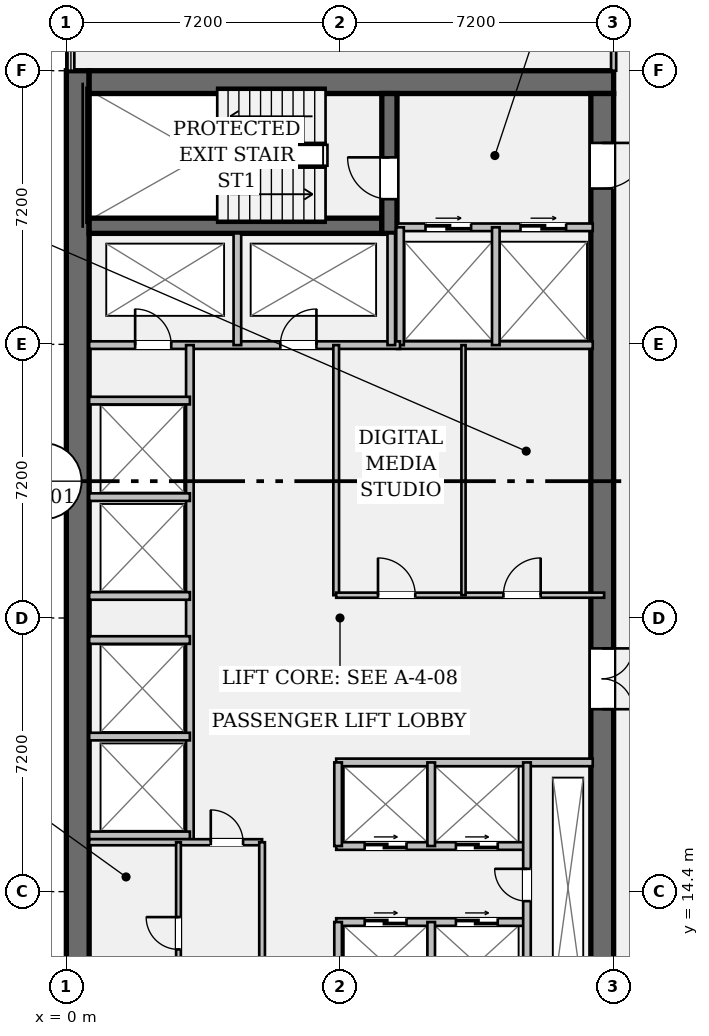
"""IFC4 building model, lengths in metres.
Left out: names, types, materials, properties, quantities, classifications, styles, units other than length and angle.
Written with IfcOpenShell. Run it as: python <this file> out.ifc"""

import sys

from ifc_helpers import new_model, si_unit, direction, frame, frame_2d, origin, place, context, subcontext, project, spatial, rectangle, extrude, element, fill, save


model = new_model("IFC4")
c1 = context("Model", 3, precision=1e-05, world=origin(), true_north=direction((0.0, 1.0)))
c2 = subcontext(c1, "Body", "Model", "MODEL_VIEW")
j1 = project(units=[si_unit("LENGTHUNIT", "METRE"), si_unit("PLANEANGLEUNIT", "RADIAN")], contexts=[c1])
p1 = place(None, origin())
s1 = spatial("IfcSite", under=j1, at=p1, CompositionType="ELEMENT")
p2 = place(p1, origin())
s2 = spatial("IfcBuilding", under=s1, at=p2, CompositionType="ELEMENT")
p3 = place(p2, frame((0.0, 0.0, 113.75)))
s3 = spatial("IfcBuildingStorey", under=s2, at=p3, CompositionType="ELEMENT", Elevation=113.75)
p4 = place(p3, frame((0.3, 7.2, 0.0), z_axis=(0.0, 0.0, 1.0), x_axis=(0.0, 1.0, 0.0)))
e1 = element("IfcWall", 1, at=p4, inside=s3, PredefinedType="SHEAR", context=c2, shape_type="SweptSolid", body=[
    extrude(rectangle(XDim=28.8, YDim=0.6, at=frame_2d((14.4, 0.0))), origin(), (0.0, 0.0, 1.0), 3.58),
])
p5 = place(p3, frame((0.6, 35.7, 0.0), z_axis=(0.0, 0.0, 1.0), x_axis=(1.0, 0.0, 0.0)))
e2 = element("IfcWall", 2, at=p5, inside=s3, PredefinedType="SHEAR", context=c2, shape_type="SweptSolid", body=[
    extrude(rectangle(XDim=13.8, YDim=0.6, at=frame_2d((6.9, 0.0))), origin(), (0.0, 0.0, 1.0), 3.58),
])
p6 = place(p3, frame((14.1, 35.4, 0.0), z_axis=(0.0, 0.0, 1.0), x_axis=(0.0, -1.0, 0.0)))
e3 = element("IfcWall", 3, at=p6, inside=s3, PredefinedType="SHEAR", context=c2, shape_type="SweptSolid", body=[
    extrude(rectangle(XDim=27.6, YDim=0.6, at=frame_2d((13.8, 0.0))), origin(), (0.0, 0.0, 1.0), 3.58),
])
p7 = place(p6, frame((1.3, 0.0, 0.0)))
e4 = element("IfcOpeningElement", 4, at=p7, cuts=e3, PredefinedType="OPENING", context=c2, shape_type="SweptSolid", body=[
    extrude(rectangle(XDim=1.2, YDim=2.15, at=frame_2d((0.6, 1.075))), frame((0.0, 0.312, 0.0), z_axis=(0.0, -1.0, 0.0), x_axis=(1.0, 0.0, 0.0)), (0.0, 0.0, 1.0), 0.624),
])
p8 = place(p6, frame((25.25, 0.0, 0.0)))
e5 = element("IfcOpeningElement", 5, at=p8, cuts=e3, PredefinedType="OPENING", context=c2, shape_type="SweptSolid", body=[
    extrude(rectangle(XDim=1.2, YDim=2.15, at=frame_2d((0.6, 1.075))), frame((0.0, 0.312, 0.0), z_axis=(0.0, -1.0, 0.0), x_axis=(1.0, 0.0, 0.0)), (0.0, 0.0, 1.0), 0.624),
])
p9 = place(p6, frame((14.6, 0.0, 0.0)))
e6 = element("IfcOpeningElement", 6, at=p9, cuts=e3, PredefinedType="OPENING", context=c2, shape_type="SweptSolid", body=[
    extrude(rectangle(XDim=1.6, YDim=2.2, at=frame_2d((0.8, 1.1))), frame((0.0, 0.312, 0.0), z_axis=(0.0, -1.0, 0.0), x_axis=(1.0, 0.0, 0.0)), (0.0, 0.0, 1.0), 0.624),
])
p10 = place(p3, frame((0.6, 31.92, 0.0), z_axis=(0.0, 0.0, 1.0), x_axis=(1.0, 0.0, 0.0)))
e7 = element("IfcWall", 7, at=p10, inside=s3, PredefinedType="SHEAR", context=c2, shape_type="SweptSolid", body=[
    extrude(rectangle(XDim=7.7, YDim=0.4, at=frame_2d((3.85, 0.0))), origin(), (0.0, 0.0, 1.0), 3.58),
])
p11 = place(p3, frame((8.5, 31.72, 0.0), z_axis=(0.0, 0.0, 1.0), x_axis=(0.0, 1.0, 0.0)))
e8 = element("IfcWall", 8, at=p11, inside=s3, PredefinedType="SHEAR", context=c2, shape_type="SweptSolid", body=[
    extrude(rectangle(XDim=3.68, YDim=0.4, at=frame_2d((1.84, 0.0))), origin(), (0.0, 0.0, 1.0), 3.58),
])
p12 = place(p11, frame((0.9, 0.0, 0.0)))
e9 = element("IfcOpeningElement", 9, at=p12, cuts=e8, PredefinedType="OPENING", context=c2, shape_type="SweptSolid", body=[
    extrude(rectangle(XDim=1.1, YDim=2.15, at=frame_2d((0.55, 1.075))), frame((0.0, 0.212, 0.0), z_axis=(0.0, -1.0, 0.0), x_axis=(1.0, 0.0, 0.0)), (0.0, 0.0, 1.0), 0.424),
])
p13 = place(p3, frame((8.7, 31.88, 0.0), z_axis=(0.0, 0.0, 1.0), x_axis=(1.0, 0.0, 0.0)))
e10 = element("IfcWall", 10, at=p13, inside=s3, PredefinedType="PARTITIONING", context=c2, shape_type="SweptSolid", body=[
    extrude(rectangle(XDim=5.15, YDim=0.2, at=frame_2d((2.575, 0.0))), origin(), (0.0, 0.0, 1.0), 3.58),
])
p14 = place(p13, frame((0.75, 0.0, 0.0)))
e11 = element("IfcOpeningElement", 11, at=p14, cuts=e10, PredefinedType="OPENING", context=c2, shape_type="SweptSolid", body=[
    extrude(rectangle(XDim=1.2, YDim=2.2, at=frame_2d((0.6, 1.1))), frame((0.0, 0.112, 0.0), z_axis=(0.0, -1.0, 0.0), x_axis=(1.0, 0.0, 0.0)), (0.0, 0.0, 1.0), 0.224),
])
p15 = place(p13, frame((3.25, 0.0, 0.0)))
e12 = element("IfcOpeningElement", 12, at=p15, cuts=e10, PredefinedType="OPENING", context=c2, shape_type="SweptSolid", body=[
    extrude(rectangle(XDim=1.2, YDim=2.2, at=frame_2d((0.6, 1.1))), frame((0.0, 0.112, 0.0), z_axis=(0.0, -1.0, 0.0), x_axis=(1.0, 0.0, 0.0)), (0.0, 0.0, 1.0), 0.224),
])
p16 = place(p3, frame((8.7, 28.78, 0.0), z_axis=(0.0, 0.0, 1.0), x_axis=(1.0, 0.0, 0.0)))
e13 = element("IfcWall", 13, at=p16, inside=s3, PredefinedType="PARTITIONING", context=c2, shape_type="SweptSolid", body=[
    extrude(rectangle(XDim=5.15, YDim=0.2, at=frame_2d((2.575, 0.0))), origin(), (0.0, 0.0, 1.0), 3.58),
])
for number, where, z_axis, x_axis in (
    (14, (8.78, 28.78, 0.0), (0.0, 0.0, 1.0), (0.0, 1.0, 0.0)),
    (15, (11.3, 28.78, 0.0), (0.0, 0.0, 1.0), (0.0, 1.0, 0.0)),
):
    element("IfcWall", number, at=place(p3, frame(where, z_axis=z_axis, x_axis=x_axis)), inside=s3, PredefinedType="PARTITIONING", context=c2, shape_type="SweptSolid", body=[
        extrude(rectangle(XDim=3.1, YDim=0.2, at=frame_2d((1.55, 0.0))), origin(), (0.0, 0.0, 1.0), 3.58),
    ])
p17 = place(p3, frame((0.6, 28.78, 0.0), z_axis=(0.0, 0.0, 1.0), x_axis=(1.0, 0.0, 0.0)))
e16 = element("IfcWall", 16, at=p17, inside=s3, PredefinedType="PARTITIONING", context=c2, shape_type="SweptSolid", body=[
    extrude(rectangle(XDim=8.18, YDim=0.2, at=frame_2d((4.09, 0.0))), origin(), (0.0, 0.0, 1.0), 3.58),
])
p18 = place(p17, frame((1.21, 0.0, 0.0)))
e17 = element("IfcOpeningElement", 17, at=p18, cuts=e16, PredefinedType="OPENING", context=c2, shape_type="SweptSolid", body=[
    extrude(rectangle(XDim=0.95, YDim=2.15, at=frame_2d((0.475, 1.075))), frame((0.0, 0.112, 0.0), z_axis=(0.0, -1.0, 0.0), x_axis=(1.0, 0.0, 0.0)), (0.0, 0.0, 1.0), 0.224),
])
p19 = place(p17, frame((5.03, 0.0, 0.0)))
e18 = element("IfcOpeningElement", 18, at=p19, cuts=e16, PredefinedType="OPENING", context=c2, shape_type="SweptSolid", body=[
    extrude(rectangle(XDim=0.95, YDim=2.15, at=frame_2d((0.475, 1.075))), frame((0.0, 0.112, 0.0), z_axis=(0.0, -1.0, 0.0), x_axis=(1.0, 0.0, 0.0)), (0.0, 0.0, 1.0), 0.224),
])
for number, where, z_axis, x_axis in (
    (19, (4.5, 28.78, 0.0), (0.0, 0.0, 1.0), (0.0, 1.0, 0.0)),
    (20, (8.55, 28.78, 0.0), (0.0, 0.0, 1.0), (0.0, 1.0, 0.0)),
):
    element("IfcWall", number, at=place(p3, frame(where, z_axis=z_axis, x_axis=x_axis)), inside=s3, PredefinedType="PARTITIONING", context=c2, shape_type="SweptSolid", body=[
        extrude(rectangle(XDim=2.94, YDim=0.2, at=frame_2d((1.47, 0.0))), origin(), (0.0, 0.0, 1.0), 3.58),
    ])
p20 = place(p3, frame((3.25, 15.7, 0.0), z_axis=(0.0, 0.0, 1.0), x_axis=(0.0, 1.0, 0.0)))
e21 = element("IfcWall", 21, at=p20, inside=s3, PredefinedType="PARTITIONING", context=c2, shape_type="SweptSolid", body=[
    extrude(rectangle(XDim=13.08, YDim=0.2, at=frame_2d((6.54, 0.0))), origin(), (0.0, 0.0, 1.0), 3.58),
])
for number, where, z_axis, x_axis in (
    (22, (0.6, 15.88, 0.0), (0.0, 0.0, 1.0), (1.0, 0.0, 0.0)),
    (23, (0.6, 18.48, 0.0), (0.0, 0.0, 1.0), (1.0, 0.0, 0.0)),
    (24, (0.6, 22.18, 0.0), (0.0, 0.0, 1.0), (1.0, 0.0, 0.0)),
    (25, (0.6, 24.78, 0.0), (0.0, 0.0, 1.0), (1.0, 0.0, 0.0)),
    (26, (0.6, 21.02, 0.0), (0.0, 0.0, 1.0), (1.0, 0.0, 0.0)),
    (27, (0.6, 27.32, 0.0), (0.0, 0.0, 1.0), (1.0, 0.0, 0.0)),
):
    element("IfcWall", number, at=place(p3, frame(where, z_axis=z_axis, x_axis=x_axis)), inside=s3, PredefinedType="PARTITIONING", context=c2, shape_type="SweptSolid", body=[
        extrude(rectangle(XDim=2.65, YDim=0.2, at=frame_2d((1.325, 0.0))), origin(), (0.0, 0.0, 1.0), 3.58),
    ])
p21 = place(p3, frame((7.1, 22.2, 0.0), z_axis=(0.0, 0.0, 1.0), x_axis=(0.0, 1.0, 0.0)))
e28 = element("IfcWall", 28, at=p21, inside=s3, PredefinedType="PARTITIONING", context=c2, shape_type="SweptSolid", body=[
    extrude(rectangle(XDim=6.58, YDim=0.15, at=frame_2d((3.29, 0.0))), origin(), (0.0, 0.0, 1.0), 3.58),
])
p22 = place(p3, frame((7.1, 22.2, 0.0), z_axis=(0.0, 0.0, 1.0), x_axis=(1.0, 0.0, 0.0)))
e29 = element("IfcWall", 29, at=p22, inside=s3, PredefinedType="PARTITIONING", context=c2, shape_type="SweptSolid", body=[
    extrude(rectangle(XDim=7.05, YDim=0.135, at=frame_2d((3.525, 0.0))), origin(), (0.0, 0.0, 1.0), 3.58),
])
p23 = place(p22, frame((1.1, 0.0, 0.0)))
e30 = element("IfcOpeningElement", 30, at=p23, cuts=e29, PredefinedType="OPENING", context=c2, shape_type="SweptSolid", body=[
    extrude(rectangle(XDim=0.98, YDim=2.15, at=frame_2d((0.49, 1.075))), frame((0.0, 0.08, 0.0), z_axis=(0.0, -1.0, 0.0), x_axis=(1.0, 0.0, 0.0)), (0.0, 0.0, 1.0), 0.159),
])
p24 = place(p22, frame((4.4, 0.0, 0.0)))
e31 = element("IfcOpeningElement", 31, at=p24, cuts=e29, PredefinedType="OPENING", context=c2, shape_type="SweptSolid", body=[
    extrude(rectangle(XDim=0.98, YDim=2.15, at=frame_2d((0.49, 1.075))), frame((0.0, 0.08, 0.0), z_axis=(0.0, -1.0, 0.0), x_axis=(1.0, 0.0, 0.0)), (0.0, 0.0, 1.0), 0.159),
])
p25 = place(p3, frame((10.45, 22.2, 0.0), z_axis=(0.0, 0.0, 1.0), x_axis=(0.0, 1.0, 0.0)))
e32 = element("IfcWall", 32, at=p25, inside=s3, PredefinedType="PARTITIONING", context=c2, shape_type="SweptSolid", body=[
    extrude(rectangle(XDim=6.58, YDim=0.11, at=frame_2d((3.29, 0.0))), origin(), (0.0, 0.0, 1.0), 3.58),
])
p26 = place(p3, frame((7.1, 17.8, 0.0), z_axis=(0.0, 0.0, 1.0), x_axis=(1.0, 0.0, 0.0)))
e33 = element("IfcWall", 33, at=p26, inside=s3, PredefinedType="PARTITIONING", context=c2, shape_type="SweptSolid", body=[
    extrude(rectangle(XDim=6.75, YDim=0.2, at=frame_2d((3.375, 0.0))), origin(), (0.0, 0.0, 1.0), 3.58),
])
p27 = place(p3, frame((7.1, 15.6, 0.0), z_axis=(0.0, 0.0, 1.0), x_axis=(1.0, 0.0, 0.0)))
e34 = element("IfcWall", 34, at=p27, inside=s3, PredefinedType="PARTITIONING", context=c2, shape_type="SweptSolid", body=[
    extrude(rectangle(XDim=5.02, YDim=0.2, at=frame_2d((2.51, 0.0))), origin(), (0.0, 0.0, 1.0), 3.58),
])
p28 = place(p27, frame((0.75, 0.0, 0.0)))
e35 = element("IfcOpeningElement", 35, at=p28, cuts=e34, PredefinedType="OPENING", context=c2, shape_type="SweptSolid", body=[
    extrude(rectangle(XDim=1.1, YDim=2.2, at=frame_2d((0.55, 1.1))), frame((0.0, 0.112, 0.0), z_axis=(0.0, -1.0, 0.0), x_axis=(1.0, 0.0, 0.0)), (0.0, 0.0, 1.0), 0.224),
])
p29 = place(p27, frame((3.15, 0.0, 0.0)))
e36 = element("IfcOpeningElement", 36, at=p29, cuts=e34, PredefinedType="OPENING", context=c2, shape_type="SweptSolid", body=[
    extrude(rectangle(XDim=1.1, YDim=2.2, at=frame_2d((0.55, 1.1))), frame((0.0, 0.112, 0.0), z_axis=(0.0, -1.0, 0.0), x_axis=(1.0, 0.0, 0.0)), (0.0, 0.0, 1.0), 0.224),
])
p30 = place(p3, frame((7.1, 13.6, 0.0), z_axis=(0.0, 0.0, 1.0), x_axis=(1.0, 0.0, 0.0)))
e37 = element("IfcWall", 37, at=p30, inside=s3, PredefinedType="PARTITIONING", context=c2, shape_type="SweptSolid", body=[
    extrude(rectangle(XDim=5.02, YDim=0.2, at=frame_2d((2.51, 0.0))), origin(), (0.0, 0.0, 1.0), 3.58),
])
p31 = place(p30, frame((0.75, 0.0, 0.0)))
e38 = element("IfcOpeningElement", 38, at=p31, cuts=e37, PredefinedType="OPENING", context=c2, shape_type="SweptSolid", body=[
    extrude(rectangle(XDim=1.1, YDim=2.2, at=frame_2d((0.55, 1.1))), frame((0.0, 0.112, 0.0), z_axis=(0.0, -1.0, 0.0), x_axis=(1.0, 0.0, 0.0)), (0.0, 0.0, 1.0), 0.224),
])
p32 = place(p30, frame((3.15, 0.0, 0.0)))
e39 = element("IfcOpeningElement", 39, at=p32, cuts=e37, PredefinedType="OPENING", context=c2, shape_type="SweptSolid", body=[
    extrude(rectangle(XDim=1.1, YDim=2.2, at=frame_2d((0.55, 1.1))), frame((0.0, 0.112, 0.0), z_axis=(0.0, -1.0, 0.0), x_axis=(1.0, 0.0, 0.0)), (0.0, 0.0, 1.0), 0.224),
])
p33 = place(p3, frame((7.15, 15.6, 0.0), z_axis=(0.0, 0.0, 1.0), x_axis=(0.0, 1.0, 0.0)))
e40 = element("IfcWall", 40, at=p33, inside=s3, PredefinedType="PARTITIONING", context=c2, shape_type="SweptSolid", body=[
    extrude(rectangle(XDim=2.2, YDim=0.2, at=frame_2d((1.1, 0.0))), origin(), (0.0, 0.0, 1.0), 3.58),
])
p34 = place(p3, frame((7.15, 11.2, 0.0), z_axis=(0.0, 0.0, 1.0), x_axis=(0.0, 1.0, 0.0)))
e41 = element("IfcWall", 41, at=p34, inside=s3, PredefinedType="PARTITIONING", context=c2, shape_type="SweptSolid", body=[
    extrude(rectangle(XDim=2.4, YDim=0.2, at=frame_2d((1.2, 0.0))), origin(), (0.0, 0.0, 1.0), 3.58),
])
p35 = place(p3, frame((9.6, 15.6, 0.0), z_axis=(0.0, 0.0, 1.0), x_axis=(0.0, 1.0, 0.0)))
e42 = element("IfcWall", 42, at=p35, inside=s3, PredefinedType="PARTITIONING", context=c2, shape_type="SweptSolid", body=[
    extrude(rectangle(XDim=2.2, YDim=0.2, at=frame_2d((1.1, 0.0))), origin(), (0.0, 0.0, 1.0), 3.58),
])
p36 = place(p3, frame((9.6, 11.2, 0.0), z_axis=(0.0, 0.0, 1.0), x_axis=(0.0, 1.0, 0.0)))
e43 = element("IfcWall", 43, at=p36, inside=s3, PredefinedType="PARTITIONING", context=c2, shape_type="SweptSolid", body=[
    extrude(rectangle(XDim=2.4, YDim=0.2, at=frame_2d((1.2, 0.0))), origin(), (0.0, 0.0, 1.0), 3.58),
])
p37 = place(p3, frame((12.12, 11.2, 0.0), z_axis=(0.0, 0.0, 1.0), x_axis=(0.0, 1.0, 0.0)))
e44 = element("IfcWall", 44, at=p37, inside=s3, PredefinedType="PARTITIONING", context=c2, shape_type="SweptSolid", body=[
    extrude(rectangle(XDim=6.6, YDim=0.2, at=frame_2d((3.3, 0.0))), origin(), (0.0, 0.0, 1.0), 3.58),
])
p38 = place(p37, frame((2.95, 0.0, 0.0)))
e45 = element("IfcOpeningElement", 45, at=p38, cuts=e44, PredefinedType="OPENING", context=c2, shape_type="SweptSolid", body=[
    extrude(rectangle(XDim=0.85, YDim=2.15, at=frame_2d((0.425, 1.075))), frame((0.0, 0.112, 0.0), z_axis=(0.0, -1.0, 0.0), x_axis=(1.0, 0.0, 0.0)), (0.0, 0.0, 1.0), 0.224),
])
p39 = place(p3, frame((0.6, 15.7, 0.0), z_axis=(0.0, 0.0, 1.0), x_axis=(1.0, 0.0, 0.0)))
e46 = element("IfcWall", 46, at=p39, inside=s3, PredefinedType="PARTITIONING", context=c2, shape_type="SweptSolid", body=[
    extrude(rectangle(XDim=4.55, YDim=0.16, at=frame_2d((2.275, 0.0))), origin(), (0.0, 0.0, 1.0), 3.58),
])
p40 = place(p39, frame((3.2, 0.0, 0.0)))
e47 = element("IfcOpeningElement", 47, at=p40, cuts=e46, PredefinedType="OPENING", context=c2, shape_type="SweptSolid", body=[
    extrude(rectangle(XDim=0.85, YDim=2.15, at=frame_2d((0.425, 1.075))), frame((0.0, 0.092, 0.0), z_axis=(0.0, -1.0, 0.0), x_axis=(1.0, 0.0, 0.0)), (0.0, 0.0, 1.0), 0.184),
])
p41 = place(p3, frame((5.15, 11.28, 0.0), z_axis=(0.0, 0.0, 1.0), x_axis=(0.0, 1.0, 0.0)))
e48 = element("IfcWall", 48, at=p41, inside=s3, PredefinedType="PARTITIONING", context=c2, shape_type="SweptSolid", body=[
    extrude(rectangle(XDim=4.42, YDim=0.15, at=frame_2d((2.21, 0.0))), origin(), (0.0, 0.0, 1.0), 3.58),
])
p42 = place(p3, frame((2.95, 11.28, 0.0), z_axis=(0.0, 0.0, 1.0), x_axis=(0.0, 1.0, 0.0)))
e49 = element("IfcWall", 49, at=p42, inside=s3, PredefinedType="PARTITIONING", context=c2, shape_type="SweptSolid", body=[
    extrude(rectangle(XDim=4.42, YDim=0.125, at=frame_2d((2.21, 0.0))), origin(), (0.0, 0.0, 1.0), 3.58),
])
p43 = place(p42, frame((1.6, 0.0, 0.0)))
e50 = element("IfcOpeningElement", 50, at=p43, cuts=e49, PredefinedType="OPENING", context=c2, shape_type="SweptSolid", body=[
    extrude(rectangle(XDim=0.85, YDim=2.15, at=frame_2d((0.425, 1.075))), frame((0.0, 0.074, 0.0), z_axis=(0.0, -1.0, 0.0), x_axis=(1.0, 0.0, 0.0)), (0.0, 0.0, 1.0), 0.149),
])
p44 = place(p3, frame((14.4, 36.0, 0.0), z_axis=(0.0, 0.0, 1.0), x_axis=(0.0, 1.0, 0.0)))
e51 = element("IfcWall", 51, at=p44, inside=s3, PredefinedType="PARTITIONING", context=c2, shape_type="SweptSolid", body=[
    extrude(rectangle(XDim=7.08, YDim=0.135, at=frame_2d((3.54, 0.0))), origin(), (0.0, 0.0, 1.0), 2.869),
])
p45 = place(p44, frame((0.85, 0.0, 0.0)))
e52 = element("IfcOpeningElement", 52, at=p45, cuts=e51, PredefinedType="OPENING", context=c2, shape_type="SweptSolid", body=[
    extrude(rectangle(XDim=0.98, YDim=2.15, at=frame_2d((0.49, 1.075))), frame((0.0, 0.08, 0.0), z_axis=(0.0, -1.0, 0.0), x_axis=(1.0, 0.0, 0.0)), (0.0, 0.0, 1.0), 0.159),
])
p46 = place(p12, origin())
e53 = element("IfcDoor", 53, at=p46, inside=s3, OperationType="SINGLE_SWING_RIGHT", PredefinedType="DOOR", context=c2, shape_type="SweptSolid", body=[
    extrude(rectangle(XDim=1.1, YDim=2.15, at=frame_2d((0.55, 1.075))), frame((0.0, 0.025, 0.0), z_axis=(0.0, -1.0, 0.0), x_axis=(1.0, 0.0, 0.0)), (0.0, 0.0, 1.0), 0.05),
])
fill(e9, e53)
p47 = place(p7, origin())
e54 = element("IfcDoor", 54, at=p47, inside=s3, OperationType="SINGLE_SWING_LEFT", PredefinedType="DOOR", context=c2, shape_type="SweptSolid", body=[
    extrude(rectangle(XDim=1.2, YDim=2.15, at=frame_2d((0.6, 1.075))), frame((0.0, 0.025, 0.0), z_axis=(0.0, -1.0, 0.0), x_axis=(1.0, 0.0, 0.0)), (0.0, 0.0, 1.0), 0.05),
])
fill(e4, e54)
p48 = place(p14, origin())
e55 = element("IfcDoor", 55, at=p48, inside=s3, OperationType="DOUBLE_DOOR_SLIDING", PredefinedType="DOOR", context=c2, shape_type="SweptSolid", body=[
    extrude(rectangle(XDim=1.2, YDim=2.2, at=frame_2d((0.6, 1.1))), frame((0.0, 0.025, 0.0), z_axis=(0.0, -1.0, 0.0), x_axis=(1.0, 0.0, 0.0)), (0.0, 0.0, 1.0), 0.05),
])
fill(e11, e55)
p49 = place(p15, origin())
e56 = element("IfcDoor", 56, at=p49, inside=s3, OperationType="DOUBLE_DOOR_SLIDING", PredefinedType="DOOR", context=c2, shape_type="SweptSolid", body=[
    extrude(rectangle(XDim=1.2, YDim=2.2, at=frame_2d((0.6, 1.1))), frame((0.0, 0.025, 0.0), z_axis=(0.0, -1.0, 0.0), x_axis=(1.0, 0.0, 0.0)), (0.0, 0.0, 1.0), 0.05),
])
fill(e12, e56)
p50 = place(p18, origin())
e57 = element("IfcDoor", 57, at=p50, inside=s3, OperationType="SINGLE_SWING_LEFT", PredefinedType="DOOR", context=c2, shape_type="SweptSolid", body=[
    extrude(rectangle(XDim=0.95, YDim=2.15, at=frame_2d((0.475, 1.075))), frame((0.0, 0.025, 0.0), z_axis=(0.0, -1.0, 0.0), x_axis=(1.0, 0.0, 0.0)), (0.0, 0.0, 1.0), 0.05),
])
fill(e17, e57)
p51 = place(p19, origin())
e58 = element("IfcDoor", 58, at=p51, inside=s3, OperationType="SINGLE_SWING_RIGHT", PredefinedType="DOOR", context=c2, shape_type="SweptSolid", body=[
    extrude(rectangle(XDim=0.95, YDim=2.15, at=frame_2d((0.475, 1.075))), frame((0.0, 0.025, 0.0), z_axis=(0.0, -1.0, 0.0), x_axis=(1.0, 0.0, 0.0)), (0.0, 0.0, 1.0), 0.05),
])
fill(e18, e58)
p52 = place(p9, origin())
e59 = element("IfcDoor", 59, at=p52, inside=s3, OperationType="DOUBLE_DOOR_SINGLE_SWING", PredefinedType="DOOR", context=c2, shape_type="SweptSolid", body=[
    extrude(rectangle(XDim=1.6, YDim=2.2, at=frame_2d((0.8, 1.1))), frame((0.0, 0.025, 0.0), z_axis=(0.0, -1.0, 0.0), x_axis=(1.0, 0.0, 0.0)), (0.0, 0.0, 1.0), 0.05),
])
fill(e6, e59)
p53 = place(p23, origin())
e60 = element("IfcDoor", 60, at=p53, inside=s3, OperationType="SINGLE_SWING_LEFT", PredefinedType="DOOR", context=c2, shape_type="SweptSolid", body=[
    extrude(rectangle(XDim=0.98, YDim=2.15, at=frame_2d((0.49, 1.075))), frame((0.0, 0.025, 0.0), z_axis=(0.0, -1.0, 0.0), x_axis=(1.0, 0.0, 0.0)), (0.0, 0.0, 1.0), 0.05),
])
fill(e30, e60)
p54 = place(p24, origin())
e61 = element("IfcDoor", 61, at=p54, inside=s3, OperationType="SINGLE_SWING_RIGHT", PredefinedType="DOOR", context=c2, shape_type="SweptSolid", body=[
    extrude(rectangle(XDim=0.98, YDim=2.15, at=frame_2d((0.49, 1.075))), frame((0.0, 0.025, 0.0), z_axis=(0.0, -1.0, 0.0), x_axis=(1.0, 0.0, 0.0)), (0.0, 0.0, 1.0), 0.05),
])
fill(e31, e61)
p55 = place(p38, origin())
e62 = element("IfcDoor", 62, at=p55, inside=s3, OperationType="SINGLE_SWING_RIGHT", PredefinedType="DOOR", context=c2, shape_type="SweptSolid", body=[
    extrude(rectangle(XDim=0.85, YDim=2.15, at=frame_2d((0.425, 1.075))), frame((0.0, 0.025, 0.0), z_axis=(0.0, -1.0, 0.0), x_axis=(1.0, 0.0, 0.0)), (0.0, 0.0, 1.0), 0.05),
])
fill(e45, e62)
p56 = place(p28, origin())
e63 = element("IfcDoor", 63, at=p56, inside=s3, OperationType="DOUBLE_DOOR_SLIDING", PredefinedType="DOOR", context=c2, shape_type="SweptSolid", body=[
    extrude(rectangle(XDim=1.1, YDim=2.2, at=frame_2d((0.55, 1.1))), frame((0.0, 0.025, 0.0), z_axis=(0.0, -1.0, 0.0), x_axis=(1.0, 0.0, 0.0)), (0.0, 0.0, 1.0), 0.05),
])
fill(e35, e63)
p57 = place(p29, origin())
e64 = element("IfcDoor", 64, at=p57, inside=s3, OperationType="DOUBLE_DOOR_SLIDING", PredefinedType="DOOR", context=c2, shape_type="SweptSolid", body=[
    extrude(rectangle(XDim=1.1, YDim=2.2, at=frame_2d((0.55, 1.1))), frame((0.0, 0.025, 0.0), z_axis=(0.0, -1.0, 0.0), x_axis=(1.0, 0.0, 0.0)), (0.0, 0.0, 1.0), 0.05),
])
fill(e36, e64)
p58 = place(p31, origin())
e65 = element("IfcDoor", 65, at=p58, inside=s3, OperationType="DOUBLE_DOOR_SLIDING", PredefinedType="DOOR", context=c2, shape_type="SweptSolid", body=[
    extrude(rectangle(XDim=1.1, YDim=2.2, at=frame_2d((0.55, 1.1))), frame((0.0, 0.025, 0.0), z_axis=(0.0, -1.0, 0.0), x_axis=(1.0, 0.0, 0.0)), (0.0, 0.0, 1.0), 0.05),
])
fill(e38, e65)
p59 = place(p32, origin())
e66 = element("IfcDoor", 66, at=p59, inside=s3, OperationType="DOUBLE_DOOR_SLIDING", PredefinedType="DOOR", context=c2, shape_type="SweptSolid", body=[
    extrude(rectangle(XDim=1.1, YDim=2.2, at=frame_2d((0.55, 1.1))), frame((0.0, 0.025, 0.0), z_axis=(0.0, -1.0, 0.0), x_axis=(1.0, 0.0, 0.0)), (0.0, 0.0, 1.0), 0.05),
])
fill(e39, e66)
p60 = place(p40, origin())
e67 = element("IfcDoor", 67, at=p60, inside=s3, OperationType="SINGLE_SWING_LEFT", PredefinedType="DOOR", context=c2, shape_type="SweptSolid", body=[
    extrude(rectangle(XDim=0.85, YDim=2.15, at=frame_2d((0.425, 1.075))), frame((0.0, 0.025, 0.0), z_axis=(0.0, -1.0, 0.0), x_axis=(1.0, 0.0, 0.0)), (0.0, 0.0, 1.0), 0.05),
])
fill(e47, e67)
p61 = place(p43, origin())
e68 = element("IfcDoor", 68, at=p61, inside=s3, OperationType="SINGLE_SWING_RIGHT", PredefinedType="DOOR", context=c2, shape_type="SweptSolid", body=[
    extrude(rectangle(XDim=0.85, YDim=2.15, at=frame_2d((0.425, 1.075))), frame((0.0, 0.025, 0.0), z_axis=(0.0, -1.0, 0.0), x_axis=(1.0, 0.0, 0.0)), (0.0, 0.0, 1.0), 0.05),
])
fill(e50, e68)
save(model, sys.argv[1])
